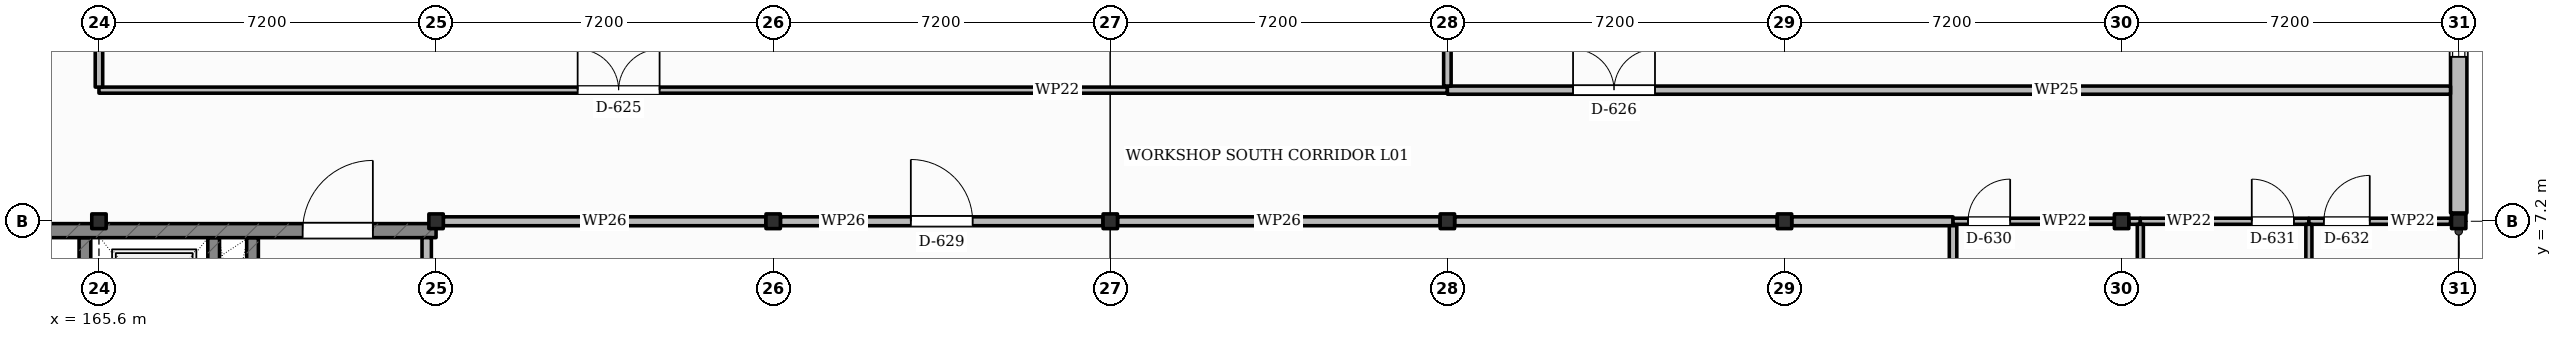
"""IFC4 building model, lengths in metres.
Left out: names, types, materials, properties, quantities, classifications, styles, units other than length and angle.
Written with IfcOpenShell. Run it as: python <this file> out.ifc"""

import sys

from ifc_helpers import new_model, si_unit, direction, frame, frame_2d, origin, origin_2d, place, context, subcontext, project, spatial, rectangle, i_section, extrude, element, fill, save


model = new_model("IFC4")
c1 = context("Model", 3, precision=1e-05, world=origin(), true_north=direction((0.0, 1.0)))
c2 = subcontext(c1, "Body", "Model", "MODEL_VIEW")
j1 = project(units=[si_unit("LENGTHUNIT", "METRE"), si_unit("PLANEANGLEUNIT", "RADIAN")], contexts=[c1])
p1 = place(None, origin())
s1 = spatial("IfcSite", under=j1, at=p1, CompositionType="ELEMENT")
p2 = place(p1, origin())
s2 = spatial("IfcBuilding", under=s1, at=p2, CompositionType="ELEMENT")
p3 = place(p2, frame((0.0, 0.0, 5.4)))
s3 = spatial("IfcBuildingStorey", under=s2, at=p3, CompositionType="ELEMENT", Elevation=5.4)
for number, where, z_axis, x_axis in (
    (1, (165.6, 7.2, 0.0), (0.0, 0.0, 1.0), (1.0, 0.0, 0.0)),
    (2, (172.8, 7.2, 0.0), (0.0, 0.0, 1.0), (1.0, 0.0, 0.0)),
    (3, (180.0, 7.2, 0.0), (0.0, 0.0, 1.0), (1.0, 0.0, 0.0)),
    (4, (187.2, 7.2, 0.0), (0.0, 0.0, 1.0), (1.0, 0.0, 0.0)),
    (5, (194.4, 7.2, 0.0), (0.0, 0.0, 1.0), (1.0, 0.0, 0.0)),
    (6, (201.6, 7.2, 0.0), (0.0, 0.0, 1.0), (1.0, 0.0, 0.0)),
    (7, (208.8, 7.2, 0.0), (0.0, 0.0, 1.0), (1.0, 0.0, 0.0)),
    (8, (216.0, 7.2, 0.0), (0.0, 0.0, 1.0), (1.0, 0.0, 0.0)),
):
    element("IfcColumn", number, at=place(p3, frame(where, z_axis=z_axis, x_axis=x_axis)), inside=s3, PredefinedType="COLUMN", context=c2, shape_type="SweptSolid", body=[
        extrude(i_section(OverallWidth=0.307, OverallDepth=0.314, WebThickness=0.012, FlangeThickness=0.019, FilletRadius=0.015, at=origin_2d()), origin(), (0.0, 0.0, 1.0), 4.5),
    ])
p4 = place(p3, frame((216.0, 14.223, 0.0), z_axis=(0.0, 0.0, 1.0), x_axis=(0.0, -1.0, 0.0)))
e9 = element("IfcWall", 9, at=p4, inside=s3, PredefinedType="SOLIDWALL", context=c2, shape_type="SweptSolid", body=[
    extrude(rectangle(XDim=6.845, YDim=0.35, at=frame_2d((3.423, 0.0))), origin(), (0.0, 0.0, 1.0), 3.493),
])
p5 = place(p4, frame((0.861, 0.0, 1.05)))
e10 = element("IfcOpeningElement", 10, at=p5, cuts=e9, PredefinedType="OPENING", context=c2, shape_type="SweptSolid", body=[
    extrude(rectangle(XDim=2.65, YDim=1.6, at=frame_2d((1.325, 0.8))), frame((0.0, 0.185, 0.0), z_axis=(0.0, -1.0, 0.0), x_axis=(1.0, 0.0, 0.0)), (0.0, 0.0, 1.0), 0.37),
])
p6 = place(p3, frame((165.3, 0.18, 0.0), z_axis=(0.0, 0.0, 1.0), x_axis=(0.0, 1.0, 0.0)))
e11 = element("IfcWall", 11, at=p6, inside=s3, PredefinedType="SHEAR", context=c2, shape_type="SweptSolid", body=[
    extrude(rectangle(XDim=6.67, YDim=0.25, at=frame_2d((3.335, 0.0))), origin(), (0.0, 0.0, 1.0), 3.55),
])
p7 = place(p6, frame((1.12, 0.0, 0.0)))
e12 = element("IfcOpeningElement", 12, at=p7, cuts=e11, PredefinedType="OPENING", context=c2, shape_type="SweptSolid", body=[
    extrude(rectangle(XDim=1.35, YDim=2.15, at=frame_2d((0.675, 1.075))), frame((0.0, 0.135, 0.0), z_axis=(0.0, -1.0, 0.0), x_axis=(1.0, 0.0, 0.0)), (0.0, 0.0, 1.0), 0.27),
])
p8 = place(p3, frame((168.05, 3.885, 0.0), z_axis=(0.0, 0.0, 1.0), x_axis=(0.0, 1.0, 0.0)))
e13 = element("IfcWall", 13, at=p8, inside=s3, PredefinedType="SHEAR", context=c2, shape_type="SweptSolid", body=[
    extrude(rectangle(XDim=2.965, YDim=0.25, at=frame_2d((1.482, 0.0))), origin(), (0.0, 0.0, 1.0), 3.55),
])
p9 = place(p3, frame((168.88, 3.885, 0.0), z_axis=(0.0, 0.0, 1.0), x_axis=(0.0, 1.0, 0.0)))
e14 = element("IfcWall", 14, at=p9, inside=s3, PredefinedType="SHEAR", context=c2, shape_type="SweptSolid", body=[
    extrude(rectangle(XDim=2.965, YDim=0.25, at=frame_2d((1.482, 0.0))), origin(), (0.0, 0.0, 1.0), 3.55),
])
p10 = place(p9, frame((0.9, 0.0, 0.0)))
e15 = element("IfcOpeningElement", 15, at=p10, cuts=e14, PredefinedType="OPENING", context=c2, shape_type="SweptSolid", body=[
    extrude(rectangle(XDim=0.92, YDim=2.05, at=frame_2d((0.46, 1.025))), frame((0.0, 0.135, 0.0), z_axis=(0.0, -1.0, 0.0), x_axis=(1.0, 0.0, 0.0)), (0.0, 0.0, 1.0), 0.27),
])
p11 = place(p3, frame((158.57, 7.0, 0.0), z_axis=(0.0, 0.0, 1.0), x_axis=(1.0, 0.0, 0.0)))
e16 = element("IfcWall", 16, at=p11, inside=s3, PredefinedType="SHEAR", context=c2, shape_type="SweptSolid", body=[
    extrude(rectangle(XDim=14.23, YDim=0.3, at=frame_2d((7.115, 0.0))), origin(), (0.0, 0.0, 1.0), 3.55),
])
p12 = place(p11, frame((11.38, 0.0, 0.0)))
e17 = element("IfcOpeningElement", 17, at=p12, cuts=e16, PredefinedType="OPENING", context=c2, shape_type="SweptSolid", body=[
    extrude(rectangle(XDim=1.5, YDim=2.15, at=frame_2d((0.75, 1.075))), frame((0.0, 0.16, 0.0), z_axis=(0.0, -1.0, 0.0), x_axis=(1.0, 0.0, 0.0)), (0.0, 0.0, 1.0), 0.32),
])
p13 = place(p3, frame((172.6, 0.18, 0.0), z_axis=(0.0, 0.0, 1.0), x_axis=(0.0, 1.0, 0.0)))
e18 = element("IfcWall", 18, at=p13, inside=s3, PredefinedType="SOLIDWALL", context=c2, shape_type="SweptSolid", body=[
    extrude(rectangle(XDim=6.67, YDim=0.2, at=frame_2d((3.335, 0.0))), origin(), (0.0, 0.0, 1.0), 3.528),
])
p14 = place(p3, frame((165.6, 10.0, 0.0), z_axis=(0.0, 0.0, 1.0), x_axis=(1.0, 0.0, 0.0)))
e19 = element("IfcWall", 19, at=p14, inside=s3, PredefinedType="PARTITIONING", context=c2, shape_type="SweptSolid", body=[
    extrude(rectangle(XDim=28.8, YDim=0.13, at=frame_2d((14.4, 0.0))), origin(), (0.0, 0.0, 1.0), 3.488),
])
p15 = place(p14, frame((10.224, 0.0, 0.0)))
e20 = element("IfcOpeningElement", 20, at=p15, cuts=e19, PredefinedType="OPENING", context=c2, shape_type="SweptSolid", body=[
    extrude(rectangle(XDim=1.75, YDim=2.25, at=frame_2d((0.875, 1.125))), frame((0.0, 0.075, 0.0), z_axis=(0.0, -1.0, 0.0), x_axis=(1.0, 0.0, 0.0)), (0.0, 0.0, 1.0), 0.15),
])
p16 = place(p3, frame((194.4, 10.0, 0.0), z_axis=(0.0, 0.0, 1.0), x_axis=(1.0, 0.0, 0.0)))
e21 = element("IfcWall", 21, at=p16, inside=s3, PredefinedType="PARTITIONING", context=c2, shape_type="SweptSolid", body=[
    extrude(rectangle(XDim=21.425, YDim=0.175, at=frame_2d((10.712, 0.0))), origin(), (0.0, 0.0, 1.0), 3.488),
])
p17 = place(p16, frame((2.684, 0.0, 0.0)))
e22 = element("IfcOpeningElement", 22, at=p17, cuts=e21, PredefinedType="OPENING", context=c2, shape_type="SweptSolid", body=[
    extrude(rectangle(XDim=1.75, YDim=2.25, at=frame_2d((0.875, 1.125))), frame((0.0, 0.097, 0.0), z_axis=(0.0, -1.0, 0.0), x_axis=(1.0, 0.0, 0.0)), (0.0, 0.0, 1.0), 0.195),
])
p18 = place(p3, frame((172.956, 7.2, 0.0), z_axis=(0.0, 0.0, 1.0), x_axis=(1.0, 0.0, 0.0)))
e23 = element("IfcWall", 23, at=p18, inside=s3, PredefinedType="PARTITIONING", context=c2, shape_type="SweptSolid", body=[
    extrude(rectangle(XDim=6.888, YDim=0.19, at=frame_2d((3.444, 0.0))), origin(), (0.0, 0.0, 1.0), 3.528),
])
p19 = place(p3, frame((180.156, 7.2, 0.0), z_axis=(0.0, 0.0, 1.0), x_axis=(1.0, 0.0, 0.0)))
e24 = element("IfcWall", 24, at=p19, inside=s3, PredefinedType="PARTITIONING", context=c2, shape_type="SweptSolid", body=[
    extrude(rectangle(XDim=6.888, YDim=0.19, at=frame_2d((3.444, 0.0))), origin(), (0.0, 0.0, 1.0), 3.488),
])
p20 = place(p19, frame((2.784, 0.0, 0.0)))
e25 = element("IfcOpeningElement", 25, at=p20, cuts=e24, PredefinedType="OPENING", context=c2, shape_type="SweptSolid", body=[
    extrude(rectangle(XDim=1.32, YDim=2.2, at=frame_2d((0.66, 1.1))), frame((0.0, 0.105, 0.0), z_axis=(0.0, -1.0, 0.0), x_axis=(1.0, 0.0, 0.0)), (0.0, 0.0, 1.0), 0.21),
])
p21 = place(p3, frame((187.356, 7.2, 0.0), z_axis=(0.0, 0.0, 1.0), x_axis=(1.0, 0.0, 0.0)))
e26 = element("IfcWall", 26, at=p21, inside=s3, PredefinedType="PARTITIONING", context=c2, shape_type="SweptSolid", body=[
    extrude(rectangle(XDim=6.888, YDim=0.19, at=frame_2d((3.444, 0.0))), origin(), (0.0, 0.0, 1.0), 3.488),
])
p22 = place(p3, frame((194.556, 7.2, 0.0), z_axis=(0.0, 0.0, 1.0), x_axis=(1.0, 0.0, 0.0)))
e27 = element("IfcWall", 27, at=p22, inside=s3, PredefinedType="PARTITIONING", context=c2, shape_type="SweptSolid", body=[
    extrude(rectangle(XDim=6.888, YDim=0.19, at=frame_2d((3.444, 0.0))), origin(), (0.0, 0.0, 1.0), 3.488),
])
p23 = place(p3, frame((201.756, 7.2, 0.0), z_axis=(0.0, 0.0, 1.0), x_axis=(1.0, 0.0, 0.0)))
e28 = element("IfcWall", 28, at=p23, inside=s3, PredefinedType="PARTITIONING", context=c2, shape_type="SweptSolid", body=[
    extrude(rectangle(XDim=3.444, YDim=0.19, at=frame_2d((1.722, 0.0))), origin(), (0.0, 0.0, 1.0), 3.488),
])
p24 = place(p3, frame((205.2, 7.2, 0.0), z_axis=(0.0, 0.0, 1.0), x_axis=(1.0, 0.0, 0.0)))
e29 = element("IfcWall", 29, at=p24, inside=s3, PredefinedType="PARTITIONING", context=c2, shape_type="SweptSolid", body=[
    extrude(rectangle(XDim=3.444, YDim=0.13, at=frame_2d((1.722, 0.0))), origin(), (0.0, 0.0, 1.0), 3.488),
])
p25 = place(p24, frame((0.32, 0.0, 0.0)))
e30 = element("IfcOpeningElement", 30, at=p25, cuts=e29, PredefinedType="OPENING", context=c2, shape_type="SweptSolid", body=[
    extrude(rectangle(XDim=0.9, YDim=2.05, at=frame_2d((0.45, 1.025))), frame((0.0, 0.075, 0.0), z_axis=(0.0, -1.0, 0.0), x_axis=(1.0, 0.0, 0.0)), (0.0, 0.0, 1.0), 0.15),
])
p26 = place(p3, frame((208.956, 7.2, 0.0), z_axis=(0.0, 0.0, 1.0), x_axis=(1.0, 0.0, 0.0)))
e31 = element("IfcWall", 31, at=p26, inside=s3, PredefinedType="PARTITIONING", context=c2, shape_type="SweptSolid", body=[
    extrude(rectangle(XDim=0.244, YDim=0.13, at=frame_2d((0.122, 0.0))), origin(), (0.0, 0.0, 1.0), 3.488),
])
p27 = place(p3, frame((209.2, 7.2, 0.0), z_axis=(0.0, 0.0, 1.0), x_axis=(1.0, 0.0, 0.0)))
e32 = element("IfcWall", 32, at=p27, inside=s3, PredefinedType="PARTITIONING", context=c2, shape_type="SweptSolid", body=[
    extrude(rectangle(XDim=3.6, YDim=0.13, at=frame_2d((1.8, 0.0))), origin(), (0.0, 0.0, 1.0), 3.55),
])
p28 = place(p27, frame((2.38, 0.0, 0.0)))
e33 = element("IfcOpeningElement", 33, at=p28, cuts=e32, PredefinedType="OPENING", context=c2, shape_type="SweptSolid", body=[
    extrude(rectangle(XDim=0.9, YDim=2.05, at=frame_2d((0.45, 1.025))), frame((0.0, 0.075, 0.0), z_axis=(0.0, -1.0, 0.0), x_axis=(1.0, 0.0, 0.0)), (0.0, 0.0, 1.0), 0.15),
])
p29 = place(p3, frame((212.8, 7.2, 0.0), z_axis=(0.0, 0.0, 1.0), x_axis=(1.0, 0.0, 0.0)))
e34 = element("IfcWall", 34, at=p29, inside=s3, PredefinedType="PARTITIONING", context=c2, shape_type="SweptSolid", body=[
    extrude(rectangle(XDim=3.025, YDim=0.13, at=frame_2d((1.512, 0.0))), origin(), (0.0, 0.0, 1.0), 3.488),
])
p30 = place(p29, frame((0.32, 0.0, 0.0)))
e35 = element("IfcOpeningElement", 35, at=p30, cuts=e34, PredefinedType="OPENING", context=c2, shape_type="SweptSolid", body=[
    extrude(rectangle(XDim=0.98, YDim=2.1, at=frame_2d((0.49, 1.05))), frame((0.0, 0.075, 0.0), z_axis=(0.0, -1.0, 0.0), x_axis=(1.0, 0.0, 0.0)), (0.0, 0.0, 1.0), 0.15),
])
p31 = place(p3, frame((165.6, 10.065, 0.0), z_axis=(0.0, 0.0, 1.0), x_axis=(0.0, 1.0, 0.0)))
e36 = element("IfcWall", 36, at=p31, inside=s3, PredefinedType="PARTITIONING", context=c2, shape_type="SweptSolid", body=[
    extrude(rectangle(XDim=4.176, YDim=0.16, at=frame_2d((2.088, 0.0))), origin(), (0.0, 0.0, 1.0), 3.528),
])
p32 = place(p3, frame((194.4, 10.088, 0.0), z_axis=(0.0, 0.0, 1.0), x_axis=(0.0, 1.0, 0.0)))
e37 = element("IfcWall", 37, at=p32, inside=s3, PredefinedType="PARTITIONING", context=c2, shape_type="SweptSolid", body=[
    extrude(rectangle(XDim=4.153, YDim=0.16, at=frame_2d((2.077, 0.0))), origin(), (0.0, 0.0, 1.0), 3.488),
])
p33 = place(p3, frame((205.2, 0.175, 0.0), z_axis=(0.0, 0.0, 1.0), x_axis=(0.0, 1.0, 0.0)))
e38 = element("IfcWall", 38, at=p33, inside=s3, PredefinedType="PARTITIONING", context=c2, shape_type="SweptSolid", body=[
    extrude(rectangle(XDim=6.93, YDim=0.16, at=frame_2d((3.465, 0.0))), origin(), (0.0, 0.0, 1.0), 3.55),
])
for number, where, z_axis, x_axis in (
    (39, (209.2, 0.1, 0.0), (0.0, 0.0, 1.0), (0.0, 1.0, 0.0)),
    (40, (212.8, 0.1, 0.0), (0.0, 0.0, 1.0), (0.0, 1.0, 0.0)),
):
    element("IfcWall", number, at=place(p3, frame(where, z_axis=z_axis, x_axis=x_axis)), inside=s3, PredefinedType="PARTITIONING", context=c2, shape_type="SweptSolid", body=[
        extrude(rectangle(XDim=7.035, YDim=0.13, at=frame_2d((3.518, 0.0))), origin(), (0.0, 0.0, 1.0), 3.55),
    ])
p34 = place(p5, origin())
e41 = element("IfcWindow", 41, at=p34, inside=s3, PartitioningType="SINGLE_PANEL", PredefinedType="WINDOW", context=c2, shape_type="SweptSolid", body=[
    extrude(rectangle(XDim=2.65, YDim=1.6, at=frame_2d((1.325, 0.8))), frame((0.0, 0.03, 0.0), z_axis=(0.0, -1.0, 0.0), x_axis=(1.0, 0.0, 0.0)), (0.0, 0.0, 1.0), 0.06),
])
fill(e10, e41)
p35 = place(p12, origin())
e42 = element("IfcDoor", 42, at=p35, inside=s3, OperationType="SINGLE_SWING_RIGHT", PredefinedType="DOOR", context=c2, shape_type="SweptSolid", body=[
    extrude(rectangle(XDim=1.5, YDim=2.15, at=frame_2d((0.75, 1.075))), frame((0.0, 0.025, 0.0), z_axis=(0.0, -1.0, 0.0), x_axis=(1.0, 0.0, 0.0)), (0.0, 0.0, 1.0), 0.05),
])
fill(e17, e42)
p36 = place(p15, origin())
e43 = element("IfcDoor", 43, at=p36, inside=s3, OperationType="DOUBLE_SWING_LEFT", PredefinedType="DOOR", context=c2, shape_type="SweptSolid", body=[
    extrude(rectangle(XDim=1.75, YDim=2.25, at=frame_2d((0.875, 1.125))), frame((0.0, 0.025, 0.0), z_axis=(0.0, -1.0, 0.0), x_axis=(1.0, 0.0, 0.0)), (0.0, 0.0, 1.0), 0.05),
])
fill(e20, e43)
p37 = place(p17, origin())
e44 = element("IfcDoor", 44, at=p37, inside=s3, OperationType="DOUBLE_SWING_LEFT", PredefinedType="DOOR", context=c2, shape_type="SweptSolid", body=[
    extrude(rectangle(XDim=1.75, YDim=2.25, at=frame_2d((0.875, 1.125))), frame((0.0, 0.025, 0.0), z_axis=(0.0, -1.0, 0.0), x_axis=(1.0, 0.0, 0.0)), (0.0, 0.0, 1.0), 0.05),
])
fill(e22, e44)
p38 = place(p20, origin())
e45 = element("IfcDoor", 45, at=p38, inside=s3, OperationType="SINGLE_SWING_LEFT", PredefinedType="DOOR", context=c2, shape_type="SweptSolid", body=[
    extrude(rectangle(XDim=1.32, YDim=2.2, at=frame_2d((0.66, 1.1))), frame((0.0, 0.025, 0.0), z_axis=(0.0, -1.0, 0.0), x_axis=(1.0, 0.0, 0.0)), (0.0, 0.0, 1.0), 0.05),
])
fill(e25, e45)
p39 = place(p25, origin())
e46 = element("IfcDoor", 46, at=p39, inside=s3, OperationType="SINGLE_SWING_RIGHT", PredefinedType="DOOR", context=c2, shape_type="SweptSolid", body=[
    extrude(rectangle(XDim=0.9, YDim=2.05, at=frame_2d((0.45, 1.025))), frame((0.0, 0.025, 0.0), z_axis=(0.0, -1.0, 0.0), x_axis=(1.0, 0.0, 0.0)), (0.0, 0.0, 1.0), 0.05),
])
fill(e30, e46)
p40 = place(p28, origin())
e47 = element("IfcDoor", 47, at=p40, inside=s3, OperationType="SINGLE_SWING_LEFT", PredefinedType="DOOR", context=c2, shape_type="SweptSolid", body=[
    extrude(rectangle(XDim=0.9, YDim=2.05, at=frame_2d((0.45, 1.025))), frame((0.0, 0.025, 0.0), z_axis=(0.0, -1.0, 0.0), x_axis=(1.0, 0.0, 0.0)), (0.0, 0.0, 1.0), 0.05),
])
fill(e33, e47)
p41 = place(p30, origin())
e48 = element("IfcDoor", 48, at=p41, inside=s3, OperationType="SINGLE_SWING_RIGHT", PredefinedType="DOOR", context=c2, shape_type="SweptSolid", body=[
    extrude(rectangle(XDim=0.98, YDim=2.1, at=frame_2d((0.49, 1.05))), frame((0.0, 0.025, 0.0), z_axis=(0.0, -1.0, 0.0), x_axis=(1.0, 0.0, 0.0)), (0.0, 0.0, 1.0), 0.05),
])
fill(e35, e48)
save(model, sys.argv[1])
